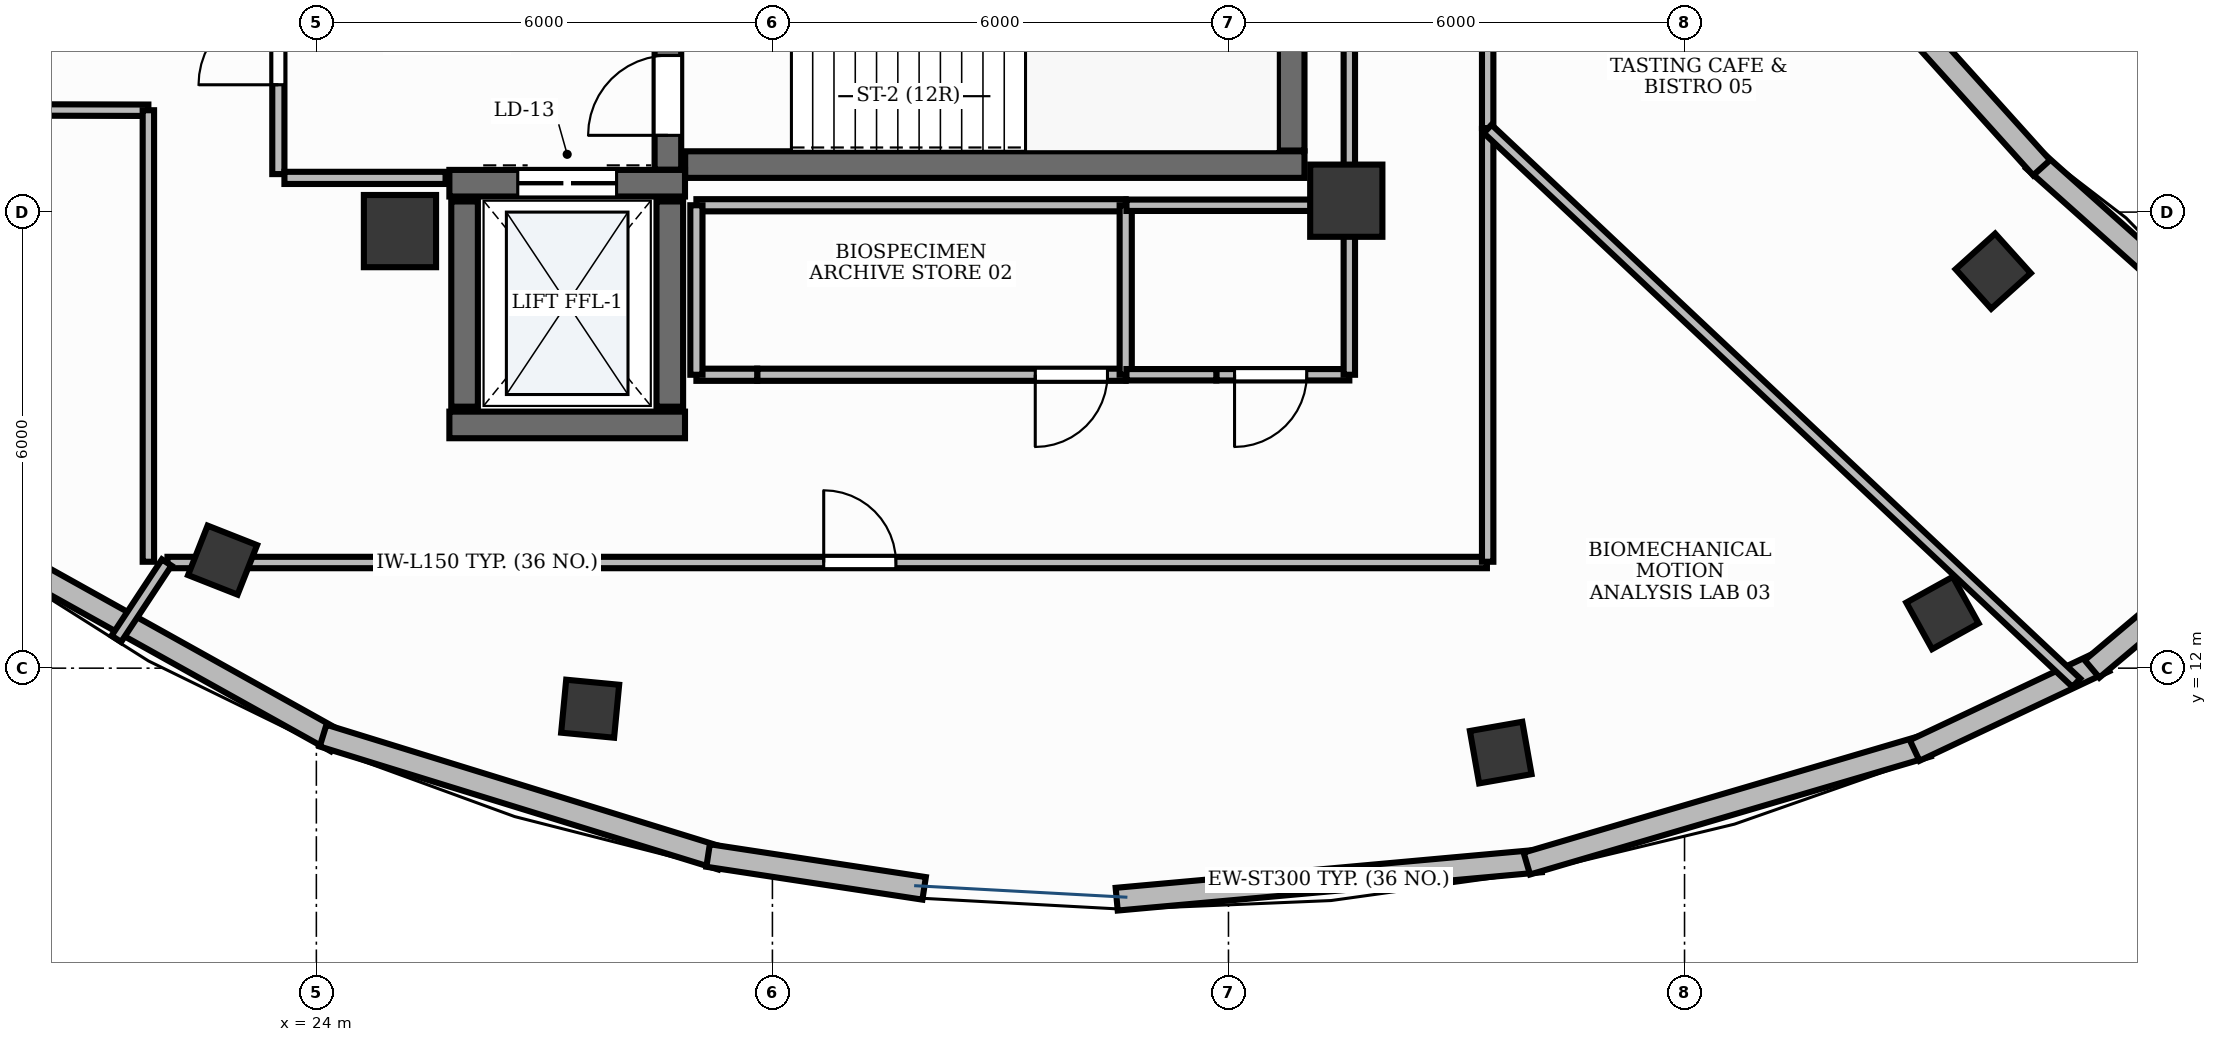
"""IFC4 building model, lengths in metres.
Left out: names, types, materials, properties, quantities, classifications, styles, units other than length and angle.
Written with IfcOpenShell. Run it as: python <this file> out.ifc"""

import sys

from ifc_helpers import new_model, si_unit, direction, frame, frame_2d, origin, origin_2d, place, context, subcontext, project, spatial, rectangle, extrude, element, fill, save


model = new_model("IFC4")
c1 = context("Model", 3, precision=1e-05, world=origin(), true_north=direction((0.0, 1.0)))
c2 = subcontext(c1, "Body", "Model", "MODEL_VIEW")
j1 = project(units=[si_unit("LENGTHUNIT", "METRE"), si_unit("PLANEANGLEUNIT", "RADIAN")], contexts=[c1])
p1 = place(None, origin())
s1 = spatial("IfcSite", under=j1, at=p1, CompositionType="ELEMENT")
p2 = place(p1, origin())
s2 = spatial("IfcBuilding", under=s1, at=p2, CompositionType="ELEMENT")
p3 = place(p2, frame((0.0, 0.0, 314.4)))
s3 = spatial("IfcBuildingStorey", under=s2, at=p3, CompositionType="ELEMENT", Elevation=314.4)
p4 = place(p3, frame((28.852, 18.625, 0.0), z_axis=(0.0, 0.0, 1.0), x_axis=(1.0, 0.0, 0.0)))
e1 = element("IfcWall", 1, at=p4, inside=s3, PredefinedType="SHEAR", context=c2, shape_type="SweptSolid", body=[
    extrude(rectangle(XDim=8.148, YDim=0.35, at=frame_2d((4.074, 0.0))), origin(), (0.0, 0.0, 1.0), 3.9),
])
p5 = place(p3, frame((36.825, 18.81, 0.0), z_axis=(0.0, 0.0, 1.0), x_axis=(0.0, 1.0, 0.0)))
e2 = element("IfcWall", 2, at=p5, inside=s3, PredefinedType="SHEAR", context=c2, shape_type="SweptSolid", body=[
    extrude(rectangle(XDim=3.08, YDim=0.35, at=frame_2d((1.54, 0.0))), origin(), (0.0, 0.0, 1.0), 3.9),
])
p6 = place(p3, frame((28.625, 18.557, 0.0), z_axis=(0.0, 0.0, 1.0), x_axis=(0.0, 1.0, 0.0)))
e3 = element("IfcWall", 3, at=p6, inside=s3, PredefinedType="SHEAR", context=c2, shape_type="SweptSolid", body=[
    extrude(rectangle(XDim=3.333, YDim=0.35, at=frame_2d((1.667, 0.0))), origin(), (0.0, 0.0, 1.0), 3.9),
])
p7 = place(p6, frame((0.453, 0.0, 0.0)))
e4 = element("IfcOpeningElement", 4, at=p7, cuts=e3, PredefinedType="OPENING", context=c2, shape_type="SweptSolid", body=[
    extrude(rectangle(XDim=1.05, YDim=2.15, at=frame_2d((0.525, 1.075))), frame((0.0, 0.19, 0.0), z_axis=(0.0, -1.0, 0.0), x_axis=(1.0, 0.0, 0.0)), (0.0, 0.0, 1.0), 0.38),
])
p8 = place(p3, frame((25.75, 15.2, 0.0), z_axis=(0.0, 0.0, 1.0), x_axis=(1.0, 0.0, 0.0)))
e5 = element("IfcWall", 5, at=p8, inside=s3, PredefinedType="SHEAR", context=c2, shape_type="SweptSolid", body=[
    extrude(rectangle(XDim=3.1, YDim=0.35, at=frame_2d((1.55, 0.0))), origin(), (0.0, 0.0, 1.0), 3.9),
])
p9 = place(p3, frame((25.75, 18.38, 0.0), z_axis=(0.0, 0.0, 1.0), x_axis=(1.0, 0.0, 0.0)))
e6 = element("IfcWall", 6, at=p9, inside=s3, PredefinedType="SHEAR", context=c2, shape_type="SweptSolid", body=[
    extrude(rectangle(XDim=3.1, YDim=0.35, at=frame_2d((1.55, 0.0))), origin(), (0.0, 0.0, 1.0), 3.9),
])
p10 = place(p9, frame((0.9, 0.0, 0.0)))
e7 = element("IfcOpeningElement", 7, at=p10, cuts=e6, PredefinedType="OPENING", context=c2, shape_type="SweptSolid", body=[
    extrude(rectangle(XDim=1.3, YDim=2.2, at=frame_2d((0.65, 1.1))), frame((0.0, 0.19, 0.0), z_axis=(0.0, -1.0, 0.0), x_axis=(1.0, 0.0, 0.0)), (0.0, 0.0, 1.0), 0.38),
])
for number, where, z_axis, x_axis in (
    (8, (25.95, 15.44, 0.0), (0.0, 0.0, 1.0), (0.0, 1.0, 0.0)),
    (9, (28.65, 15.44, 0.0), (0.0, 0.0, 1.0), (0.0, 1.0, 0.0)),
):
    element("IfcWall", number, at=place(p3, frame(where, z_axis=z_axis, x_axis=x_axis)), inside=s3, PredefinedType="SHEAR", context=c2, shape_type="SweptSolid", body=[
        extrude(rectangle(XDim=2.7, YDim=0.35, at=frame_2d((1.35, 0.0))), origin(), (0.0, 0.0, 1.0), 3.9),
    ])
for number, where, z_axis, x_axis in (
    (10, (25.1, 17.75, -0.0), (0.0, 0.0, 1.0), (1.0, 0.0, 0.0)),
    (11, (37.55, 18.15, -0.0), (0.0, 0.0, 1.0), (1.0, 0.0, 0.0)),
):
    element("IfcColumn", number, at=place(p3, frame(where, z_axis=z_axis, x_axis=x_axis)), inside=s3, PredefinedType="PILASTER", context=c2, shape_type="SweptSolid", body=[
        extrude(rectangle(XDim=0.95, YDim=0.95, at=origin_2d()), origin(), (0.0, 0.0, 1.0), 3.901),
    ])
for number, where, z_axis, x_axis in (
    (12, (22.766, 13.421, -0.0), (0.0, 0.0, 1.0), (-0.93, 0.367, 0.0)),
    (13, (27.602, 11.466, -0.0), (0.0, 0.0, 1.0), (-0.995, 0.095, 0.0)),
    (14, (39.582, 10.889, -0.0), (0.0, 0.0, 1.0), (0.985, 0.173, 0.0)),
    (15, (45.393, 12.726, -0.0), (0.0, 0.0, 1.0), (0.875, 0.485, 0.0)),
    (16, (46.061, 17.223, -0.0), (0.0, 0.0, 1.0), (-0.669, 0.743, 0.0)),
):
    element("IfcColumn", number, at=place(p3, frame(where, z_axis=z_axis, x_axis=x_axis)), inside=s3, PredefinedType="COLUMN", context=c2, shape_type="SweptSolid", body=[
        extrude(rectangle(XDim=0.7, YDim=0.7, at=origin_2d()), origin(), (0.0, 0.0, 1.0), 3.901),
    ])
p11 = place(p3, frame((19.648, 13.61, 0.0), z_axis=(0.0, 0.0, 1.0), x_axis=(0.87350676692, -0.486812004932, 0.0)))
e17 = element("IfcWall", 17, at=p11, inside=s3, PredefinedType="STANDARD", context=c2, shape_type="SweptSolid", body=[
    extrude(rectangle(XDim=5.282, YDim=0.3, at=frame_2d((2.641, 0.0))), origin(), (0.0, 0.0, 1.0), 3.9),
])
p12 = place(p3, frame((24.088, 11.113, 0.0), z_axis=(0.0, 0.0, 1.0), x_axis=(0.955535200816, -0.29487705913, 0.0)))
e18 = element("IfcWall", 18, at=p12, inside=s3, PredefinedType="STANDARD", context=c2, shape_type="SweptSolid", body=[
    extrude(rectangle(XDim=5.485, YDim=0.3, at=frame_2d((2.743, 0.0))), origin(), (0.0, 0.0, 1.0), 3.9),
])
p13 = place(p3, frame((29.154, 9.535, 0.0), z_axis=(0.0, 0.0, 1.0), x_axis=(0.988626523862, -0.150391476873, 0.0)))
e19 = element("IfcWall", 19, at=p13, inside=s3, PredefinedType="STANDARD", context=c2, shape_type="SweptSolid", body=[
    extrude(rectangle(XDim=2.875, YDim=0.3, at=frame_2d((1.438, 0.0))), origin(), (0.0, 0.0, 1.0), 3.9),
])
p14 = place(p3, frame((34.529, 8.961, 0.0), z_axis=(0.0, 0.0, 1.0), x_axis=(0.995950163058, 0.089907022552, 0.0)))
e20 = element("IfcWall", 20, at=p14, inside=s3, PredefinedType="STANDARD", context=c2, shape_type="SweptSolid", body=[
    extrude(rectangle(XDim=5.602, YDim=0.3, at=frame_2d((2.801, 0.0))), origin(), (0.0, 0.0, 1.0), 3.9),
])
p15 = place(p3, frame((39.925, 9.429, 0.0), z_axis=(0.0, 0.0, 1.0), x_axis=(0.959276315934, 0.282469378321, 0.0)))
e21 = element("IfcWall", 21, at=p15, inside=s3, PredefinedType="STANDARD", context=c2, shape_type="SweptSolid", body=[
    extrude(rectangle(XDim=5.495, YDim=0.3, at=frame_2d((2.748, 0.0))), origin(), (0.0, 0.0, 1.0), 3.9),
])
p16 = place(p3, frame((45.028, 10.917, 0.0), z_axis=(0.0, 0.0, 1.0), x_axis=(0.904397474905, 0.426690997545, 0.0)))
e22 = element("IfcWall", 22, at=p16, inside=s3, PredefinedType="STANDARD", context=c2, shape_type="SweptSolid", body=[
    extrude(rectangle(XDim=2.761, YDim=0.3, at=frame_2d((1.381, 0.0))), origin(), (0.0, 0.0, 1.0), 3.9),
])
p17 = place(p3, frame((47.361, 11.99, 0.0), z_axis=(0.0, 0.0, 1.0), x_axis=(0.764911198117, 0.644135745783, 0.0)))
e23 = element("IfcWall", 23, at=p17, inside=s3, PredefinedType="STANDARD", context=c2, shape_type="SweptSolid", body=[
    extrude(rectangle(XDim=1.589, YDim=0.3, at=frame_2d((0.794, 0.0))), origin(), (0.0, 0.0, 1.0), 3.9),
])
p18 = place(p3, frame((48.772, 16.742, 0.0), z_axis=(0.0, 0.0, 1.0), x_axis=(-0.745805540728, 0.666163715178, 0.0)))
e24 = element("IfcWall", 24, at=p18, inside=s3, PredefinedType="STANDARD", context=c2, shape_type="SweptSolid", body=[
    extrude(rectangle(XDim=2.918, YDim=0.3, at=frame_2d((1.459, 0.0))), origin(), (0.0, 0.0, 1.0), 3.9),
])
p19 = place(p3, frame((46.698, 18.584, 0.0), z_axis=(0.0, 0.0, 1.0), x_axis=(-0.66919836837, 0.743083806694, 0.0)))
e25 = element("IfcWall", 25, at=p19, inside=s3, PredefinedType="STANDARD", context=c2, shape_type="SweptSolid", body=[
    extrude(rectangle(XDim=2.829, YDim=0.3, at=frame_2d((1.414, 0.0))), origin(), (0.0, 0.0, 1.0), 2.625),
])
p20 = place(p3, frame((23.5, 18.5, 0.0), z_axis=(0.0, 0.0, 1.0), x_axis=(0.0, 1.0, 0.0)))
e26 = element("IfcWall", 26, at=p20, inside=s3, PredefinedType="PARTITIONING", context=c2, shape_type="SweptSolid", body=[
    extrude(rectangle(XDim=3.4, YDim=0.16, at=frame_2d((1.7, 0.0))), origin(), (0.0, 0.0, 1.0), 2.22),
])
p21 = place(p20, frame((1.175, 0.0, 0.0)))
e27 = element("IfcOpeningElement", 27, at=p21, cuts=e26, PredefinedType="OPENING", context=c2, shape_type="SweptSolid", body=[
    extrude(rectangle(XDim=1.05, YDim=2.15, at=frame_2d((0.525, 1.075))), frame((0.0, 0.095, 0.0), z_axis=(0.0, -1.0, 0.0), x_axis=(1.0, 0.0, 0.0)), (0.0, 0.0, 1.0), 0.19),
])
p22 = place(p3, frame((23.58, 18.45, 0.0), z_axis=(0.0, 0.0, 1.0), x_axis=(1.0, 0.0, 0.0)))
e28 = element("IfcWall", 28, at=p22, inside=s3, PredefinedType="PARTITIONING", context=c2, shape_type="SweptSolid", body=[
    extrude(rectangle(XDim=2.12, YDim=0.16, at=frame_2d((1.06, 0.0))), origin(), (0.0, 0.0, 1.0), 2.22),
])
p23 = place(p3, frame((34.648, 15.86, 0.0), z_axis=(0.0, 0.0, 1.0), x_axis=(-1.0, 0.0, 0.0)))
e29 = element("IfcWall", 29, at=p23, inside=s3, PredefinedType="PARTITIONING", context=c2, shape_type="SweptSolid", body=[
    extrude(rectangle(XDim=4.848, YDim=0.16, at=frame_2d((2.424, 0.0))), origin(), (0.0, 0.0, 1.0), 2.22),
])
p24 = place(p23, frame((0.24, 0.0, 0.0)))
e30 = element("IfcOpeningElement", 30, at=p24, cuts=e29, PredefinedType="OPENING", context=c2, shape_type="SweptSolid", body=[
    extrude(rectangle(XDim=0.95, YDim=2.15, at=frame_2d((0.475, 1.075))), frame((0.0, 0.095, 0.0), z_axis=(0.0, -1.0, 0.0), x_axis=(1.0, 0.0, 0.0)), (0.0, 0.0, 1.0), 0.19),
])
p25 = place(p3, frame((22.041, 13.39, 0.0), z_axis=(0.0, 0.0, 1.0), x_axis=(1.0, 0.0, 0.0)))
e31 = element("IfcWall", 31, at=p25, inside=s3, PredefinedType="PARTITIONING", context=c2, shape_type="SweptSolid", body=[
    extrude(rectangle(XDim=17.359, YDim=0.15, at=frame_2d((8.679, 0.0))), origin(), (0.0, 0.0, 1.0), 2.22),
])
p26 = place(p25, frame((8.634, 0.0, 0.0)))
e32 = element("IfcOpeningElement", 32, at=p26, cuts=e31, PredefinedType="OPENING", context=c2, shape_type="SweptSolid", body=[
    extrude(rectangle(XDim=0.95, YDim=2.15, at=frame_2d((0.475, 1.075))), frame((0.0, 0.09, 0.0), z_axis=(0.0, -1.0, 0.0), x_axis=(1.0, 0.0, 0.0)), (0.0, 0.0, 1.0), 0.18),
])
p27 = place(p3, frame((37.59, 15.86, 0.0), z_axis=(0.0, 0.0, 1.0), x_axis=(-1.0, 0.0, 0.0)))
e33 = element("IfcWall", 33, at=p27, inside=s3, PredefinedType="PARTITIONING", context=c2, shape_type="SweptSolid", body=[
    extrude(rectangle(XDim=1.75, YDim=0.15, at=frame_2d((0.875, 0.0))), origin(), (0.0, 0.0, 1.0), 2.22),
])
p28 = place(p27, frame((0.56, 0.0, 0.0)))
e34 = element("IfcOpeningElement", 34, at=p28, cuts=e33, PredefinedType="OPENING", context=c2, shape_type="SweptSolid", body=[
    extrude(rectangle(XDim=0.95, YDim=2.15, at=frame_2d((0.475, 1.075))), frame((0.0, 0.09, 0.0), z_axis=(0.0, -1.0, 0.0), x_axis=(1.0, 0.0, 0.0)), (0.0, 0.0, 1.0), 0.18),
])
p29 = place(p3, frame((39.41, 19.105, 0.0), z_axis=(0.0, 0.0, 1.0), x_axis=(0.0, 1.0, 0.0)))
e35 = element("IfcWall", 35, at=p29, inside=s3, PredefinedType="PARTITIONING", context=c2, shape_type="SweptSolid", body=[
    extrude(rectangle(XDim=9.643, YDim=0.15, at=frame_2d((4.822, 0.0))), origin(), (0.0, 0.0, 1.0), 2.22),
])
p30 = place(p29, frame((2.567, 0.0, 0.0)))
e36 = element("IfcOpeningElement", 36, at=p30, cuts=e35, PredefinedType="OPENING", context=c2, shape_type="SweptSolid", body=[
    extrude(rectangle(XDim=0.95, YDim=2.15, at=frame_2d((0.475, 1.075))), frame((0.0, 0.09, 0.0), z_axis=(0.0, -1.0, 0.0), x_axis=(1.0, 0.0, 0.0)), (0.0, 0.0, 1.0), 0.18),
])
p31 = place(p3, frame((17.2, 19.35, 0.0), z_axis=(0.0, 0.0, 1.0), x_axis=(0.999997622206, -0.002180729882, 0.0)))
e37 = element("IfcWall", 37, at=p31, inside=s3, PredefinedType="PARTITIONING", context=c2, shape_type="SweptSolid", body=[
    extrude(rectangle(XDim=4.59, YDim=0.15, at=frame_2d((2.295, 0.0))), origin(), (0.0, 0.0, 1.0), 2.22),
])
p32 = place(p3, frame((21.79, 19.34, 0.0), z_axis=(0.0, 0.0, 1.0), x_axis=(0.0, -1.0, 0.0)))
e38 = element("IfcWall", 38, at=p32, inside=s3, PredefinedType="PARTITIONING", context=c2, shape_type="SweptSolid", body=[
    extrude(rectangle(XDim=5.94, YDim=0.15, at=frame_2d((2.97, 0.0))), origin(), (0.0, 0.0, 1.0), 2.22),
])
p33 = place(p3, frame((22.031, 13.39, 0.0), z_axis=(0.0, 0.0, 1.0), x_axis=(-0.550618818577, -0.834756800888, 0.0)))
e39 = element("IfcWall", 39, at=p33, inside=s3, PredefinedType="PARTITIONING", context=c2, shape_type="SweptSolid", body=[
    extrude(rectangle(XDim=1.203, YDim=0.15, at=frame_2d((0.602, 0.0))), origin(), (0.0, 0.0, 1.0), 2.22),
])
p34 = place(p3, frame((29.0, 18.09, 0.0), z_axis=(0.0, 0.0, 1.0), x_axis=(1.0, 0.0, 0.0)))
e40 = element("IfcWall", 40, at=p34, inside=s3, PredefinedType="PARTITIONING", context=c2, shape_type="SweptSolid", body=[
    extrude(rectangle(XDim=5.648, YDim=0.16, at=frame_2d((2.824, 0.0))), origin(), (0.0, 0.0, 1.0), 2.22),
])
p35 = place(p3, frame((34.648, 18.09, 0.0), z_axis=(0.0, 0.0, 1.0), x_axis=(0.0, -1.0, 0.0)))
e41 = element("IfcWall", 41, at=p35, inside=s3, PredefinedType="PARTITIONING", context=c2, shape_type="SweptSolid", body=[
    extrude(rectangle(XDim=2.23, YDim=0.16, at=frame_2d((1.115, 0.0))), origin(), (0.0, 0.0, 1.0), 2.22),
])
p36 = place(p3, frame((29.8, 15.86, 0.0), z_axis=(0.0, 0.0, 1.0), x_axis=(-1.0, 0.0, 0.0)))
e42 = element("IfcWall", 42, at=p36, inside=s3, PredefinedType="PARTITIONING", context=c2, shape_type="SweptSolid", body=[
    extrude(rectangle(XDim=0.8, YDim=0.16, at=frame_2d((0.4, 0.0))), origin(), (0.0, 0.0, 1.0), 2.22),
])
p37 = place(p3, frame((29.0, 15.86, 0.0), z_axis=(0.0, 0.0, 1.0), x_axis=(0.0, 1.0, 0.0)))
e43 = element("IfcWall", 43, at=p37, inside=s3, PredefinedType="PARTITIONING", context=c2, shape_type="SweptSolid", body=[
    extrude(rectangle(XDim=2.23, YDim=0.16, at=frame_2d((1.115, 0.0))), origin(), (0.0, 0.0, 1.0), 2.22),
])
p38 = place(p3, frame((39.41, 13.4, 0.0), z_axis=(0.0, 0.0, 1.0), x_axis=(0.0, 1.0, 0.0)))
e44 = element("IfcWall", 44, at=p38, inside=s3, PredefinedType="PARTITIONING", context=c2, shape_type="SweptSolid", body=[
    extrude(rectangle(XDim=5.695, YDim=0.15, at=frame_2d((2.848, 0.0))), origin(), (0.0, 0.0, 1.0), 2.22),
])
p39 = place(p3, frame((39.41, 19.095, 0.0), z_axis=(0.0, 0.0, 1.0), x_axis=(0.728315245979, -0.685242221754, 0.0)))
e45 = element("IfcWall", 45, at=p39, inside=s3, PredefinedType="PARTITIONING", context=c2, shape_type="SweptSolid", body=[
    extrude(rectangle(XDim=10.633, YDim=0.15, at=frame_2d((5.317, 0.0))), origin(), (0.0, 0.0, 1.0), 2.22),
])
p40 = place(p3, frame((37.59, 20.807, 0.0), z_axis=(0.0, 0.0, 1.0), x_axis=(0.0, -1.0, 0.0)))
e46 = element("IfcWall", 46, at=p40, inside=s3, PredefinedType="PARTITIONING", context=c2, shape_type="SweptSolid", body=[
    extrude(rectangle(XDim=4.947, YDim=0.15, at=frame_2d((2.474, 0.0))), origin(), (0.0, 0.0, 1.0), 2.22),
])
p41 = place(p3, frame((35.84, 15.86, 0.0), z_axis=(0.0, 0.0, 1.0), x_axis=(-1.0, 0.0, 0.0)))
e47 = element("IfcWall", 47, at=p41, inside=s3, PredefinedType="PARTITIONING", context=c2, shape_type="SweptSolid", body=[
    extrude(rectangle(XDim=1.182, YDim=0.15, at=frame_2d((0.591, 0.0))), origin(), (0.0, 0.0, 1.0), 2.22),
])
p42 = place(p3, frame((34.658, 18.09, 0.0), z_axis=(0.0, 0.0, 1.0), x_axis=(1.0, 0.0, 0.0)))
e48 = element("IfcWall", 48, at=p42, inside=s3, PredefinedType="PARTITIONING", context=c2, shape_type="SweptSolid", body=[
    extrude(rectangle(XDim=2.692, YDim=0.15, at=frame_2d((1.346, 0.0))), origin(), (0.0, 0.0, 1.0), 2.22),
])
p43 = place(p7, origin())
e49 = element("IfcDoor", 49, at=p43, inside=s3, OperationType="SINGLE_SWING_LEFT", PredefinedType="DOOR", context=c2, shape_type="SweptSolid", body=[
    extrude(rectangle(XDim=1.05, YDim=2.15, at=frame_2d((0.525, 1.075))), frame((0.0, 0.025, 0.0), z_axis=(0.0, -1.0, 0.0), x_axis=(1.0, 0.0, 0.0)), (0.0, 0.0, 1.0), 0.05),
])
fill(e4, e49)
p44 = place(p10, origin())
e50 = element("IfcDoor", 50, at=p44, inside=s3, OperationType="DOUBLE_DOOR_SLIDING", PredefinedType="DOOR", context=c2, shape_type="SweptSolid", body=[
    extrude(rectangle(XDim=1.3, YDim=2.2, at=frame_2d((0.65, 1.1))), frame((0.0, 0.025, 0.0), z_axis=(0.0, -1.0, 0.0), x_axis=(1.0, 0.0, 0.0)), (0.0, 0.0, 1.0), 0.05),
])
fill(e7, e50)
p45 = place(p21, origin())
e51 = element("IfcDoor", 51, at=p45, inside=s3, OperationType="SINGLE_SWING_LEFT", PredefinedType="DOOR", context=c2, shape_type="SweptSolid", body=[
    extrude(rectangle(XDim=1.05, YDim=2.15, at=frame_2d((0.525, 1.075))), frame((0.0, 0.025, 0.0), z_axis=(0.0, -1.0, 0.0), x_axis=(1.0, 0.0, 0.0)), (0.0, 0.0, 1.0), 0.05),
])
fill(e27, e51)
p46 = place(p24, origin())
e52 = element("IfcDoor", 52, at=p46, inside=s3, OperationType="SINGLE_SWING_RIGHT", PredefinedType="DOOR", context=c2, shape_type="SweptSolid", body=[
    extrude(rectangle(XDim=0.95, YDim=2.15, at=frame_2d((0.475, 1.075))), frame((0.0, 0.025, 0.0), z_axis=(0.0, -1.0, 0.0), x_axis=(1.0, 0.0, 0.0)), (0.0, 0.0, 1.0), 0.05),
])
fill(e30, e52)
p47 = place(p26, origin())
e53 = element("IfcDoor", 53, at=p47, inside=s3, OperationType="SINGLE_SWING_LEFT", PredefinedType="DOOR", context=c2, shape_type="SweptSolid", body=[
    extrude(rectangle(XDim=0.95, YDim=2.15, at=frame_2d((0.475, 1.075))), frame((0.0, 0.025, 0.0), z_axis=(0.0, -1.0, 0.0), x_axis=(1.0, 0.0, 0.0)), (0.0, 0.0, 1.0), 0.05),
])
fill(e32, e53)
p48 = place(p28, origin())
e54 = element("IfcDoor", 54, at=p48, inside=s3, OperationType="SINGLE_SWING_RIGHT", PredefinedType="DOOR", context=c2, shape_type="SweptSolid", body=[
    extrude(rectangle(XDim=0.95, YDim=2.15, at=frame_2d((0.475, 1.075))), frame((0.0, 0.025, 0.0), z_axis=(0.0, -1.0, 0.0), x_axis=(1.0, 0.0, 0.0)), (0.0, 0.0, 1.0), 0.05),
])
fill(e34, e54)
save(model, sys.argv[1])
